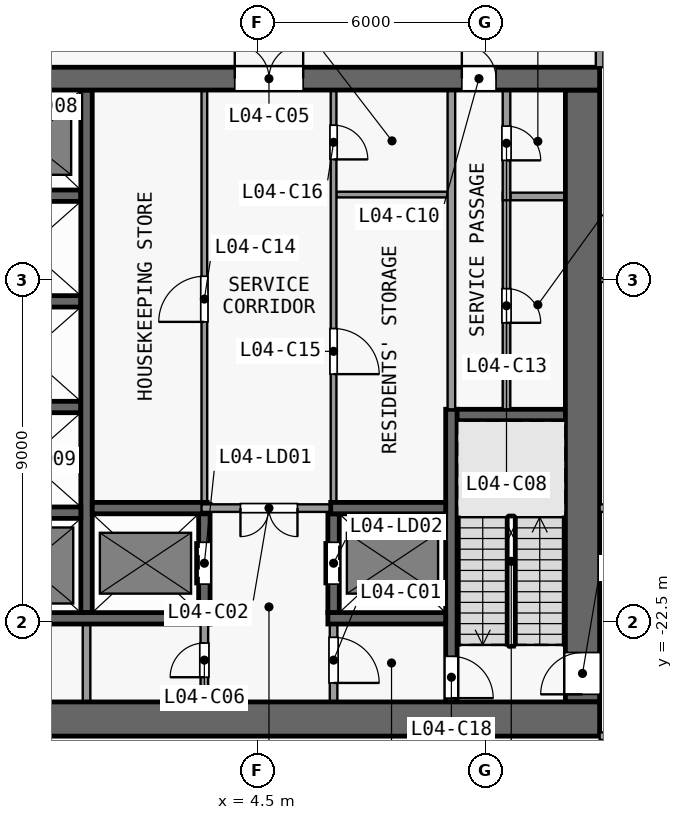
"""IFC4 building model, lengths in metres.
Left out: names, types, materials, properties, quantities, classifications, styles, units other than length and angle.
Written with IfcOpenShell. Run it as: python <this file> out.ifc"""

import sys

from ifc_helpers import new_model, si_unit, direction, frame, frame_2d, origin, place, context, subcontext, project, spatial, rectangle, extrude, element, fill, save


model = new_model("IFC4")
c1 = context("Model", 3, precision=1e-05, world=origin(), true_north=direction((0.0, 1.0)))
c2 = subcontext(c1, "Body", "Model", "MODEL_VIEW")
j1 = project(units=[si_unit("LENGTHUNIT", "METRE"), si_unit("PLANEANGLEUNIT", "RADIAN")], contexts=[c1])
p1 = place(None, origin())
s1 = spatial("IfcSite", under=j1, at=p1, CompositionType="ELEMENT")
p2 = place(p1, origin())
s2 = spatial("IfcBuilding", under=s1, at=p2, CompositionType="ELEMENT")
p3 = place(p2, frame((0.0, 0.0, 23.5)))
s3 = spatial("IfcBuildingStorey", under=s2, at=p3, CompositionType="ELEMENT", Elevation=23.5)
p4 = place(p3, frame((-13.5, -25.05, 0.0), z_axis=(0.0, 0.0, 1.0), x_axis=(1.0, 0.0, 0.0)))
e1 = element("IfcWall", 1, at=p4, inside=s3, PredefinedType="SHEAR", context=c2, shape_type="SweptSolid", body=[
    extrude(rectangle(XDim=27.0, YDim=0.9, at=frame_2d((13.5, 0.0))), origin(), (0.0, 0.0, 1.0), 4.15),
])
p5 = place(p3, frame((-13.5, -8.2, 0.0), z_axis=(0.0, 0.0, 1.0), x_axis=(1.0, 0.0, 0.0)))
e2 = element("IfcWall", 2, at=p5, inside=s3, PredefinedType="SHEAR", context=c2, shape_type="SweptSolid", body=[
    extrude(rectangle(XDim=27.0, YDim=0.6, at=frame_2d((13.5, 0.0))), origin(), (0.0, 0.0, 1.0), 4.15),
])
p6 = place(p5, frame((7.8, 0.0, 0.0)))
e3 = element("IfcOpeningElement", 3, at=p6, cuts=e2, PredefinedType="OPENING", context=c2, shape_type="SweptSolid", body=[
    extrude(rectangle(XDim=1.8, YDim=2.1, at=frame_2d((0.9, 1.05))), frame((0.0, 0.31, 0.0), z_axis=(0.0, -1.0, 0.0), x_axis=(1.0, 0.0, 0.0)), (0.0, 0.0, 1.0), 0.62),
])
p7 = place(p5, frame((17.4, 0.0, 0.0)))
e4 = element("IfcOpeningElement", 4, at=p7, cuts=e2, PredefinedType="OPENING", context=c2, shape_type="SweptSolid", body=[
    extrude(rectangle(XDim=1.8, YDim=2.1, at=frame_2d((0.9, 1.05))), frame((0.0, 0.31, 0.0), z_axis=(0.0, -1.0, 0.0), x_axis=(1.0, 0.0, 0.0)), (0.0, 0.0, 1.0), 0.62),
])
p8 = place(p5, frame((2.725, 0.0, 0.0)))
e5 = element("IfcOpeningElement", 5, at=p8, cuts=e2, PredefinedType="OPENING", context=c2, shape_type="SweptSolid", body=[
    extrude(rectangle(XDim=0.9, YDim=2.1, at=frame_2d((0.45, 1.05))), frame((0.0, 0.31, 0.0), z_axis=(0.0, -1.0, 0.0), x_axis=(1.0, 0.0, 0.0)), (0.0, 0.0, 1.0), 0.62),
])
p9 = place(p5, frame((23.375, 0.0, 0.0)))
e6 = element("IfcOpeningElement", 6, at=p9, cuts=e2, PredefinedType="OPENING", context=c2, shape_type="SweptSolid", body=[
    extrude(rectangle(XDim=0.9, YDim=2.1, at=frame_2d((0.45, 1.05))), frame((0.0, 0.31, 0.0), z_axis=(0.0, -1.0, 0.0), x_axis=(1.0, 0.0, 0.0)), (0.0, 0.0, 1.0), 0.62),
])
p10 = place(p3, frame((13.05, -24.6, 0.0), z_axis=(0.0, 0.0, 1.0), x_axis=(0.0, 1.0, 0.0)))
e7 = element("IfcWall", 7, at=p10, inside=s3, PredefinedType="SHEAR", context=c2, shape_type="SweptSolid", body=[
    extrude(rectangle(XDim=16.1, YDim=0.9, at=frame_2d((8.05, 0.0))), origin(), (0.0, 0.0, 1.0), 4.15),
])
p11 = place(p10, frame((0.2, 0.0, 0.0)))
e8 = element("IfcOpeningElement", 8, at=p11, cuts=e7, PredefinedType="OPENING", context=c2, shape_type="SweptSolid", body=[
    extrude(rectangle(XDim=1.1, YDim=2.1, at=frame_2d((0.55, 1.05))), frame((0.0, 0.46, 0.0), z_axis=(0.0, -1.0, 0.0), x_axis=(1.0, 0.0, 0.0)), (0.0, 0.0, 1.0), 0.92),
])
p12 = place(p3, frame((-2.95, -22.4, 0.0), z_axis=(0.0, 0.0, 1.0), x_axis=(1.0, 0.0, 0.0)))
e9 = element("IfcWall", 9, at=p12, inside=s3, PredefinedType="SHEAR", context=c2, shape_type="SweptSolid", body=[
    extrude(rectangle(XDim=6.2, YDim=0.3, at=frame_2d((3.1, 0.0))), origin(), (0.0, 0.0, 1.0), 4.15),
])
p13 = place(p3, frame((6.35, -22.4, 0.0), z_axis=(0.0, 0.0, 1.0), x_axis=(1.0, 0.0, 0.0)))
e10 = element("IfcWall", 10, at=p13, inside=s3, PredefinedType="SHEAR", context=c2, shape_type="SweptSolid", body=[
    extrude(rectangle(XDim=3.1, YDim=0.3, at=frame_2d((1.55, 0.0))), origin(), (0.0, 0.0, 1.0), 4.15),
])
p14 = place(p3, frame((-2.95, -19.62, 0.0), z_axis=(0.0, 0.0, 1.0), x_axis=(1.0, 0.0, 0.0)))
e11 = element("IfcWall", 11, at=p14, inside=s3, PredefinedType="SHEAR", context=c2, shape_type="SweptSolid", body=[
    extrude(rectangle(XDim=2.8, YDim=0.3, at=frame_2d((1.4, 0.0))), origin(), (0.0, 0.0, 1.0), 4.15),
])
p15 = place(p3, frame((0.15, -19.5, 0.0), z_axis=(0.0, 0.0, 1.0), x_axis=(1.0, 0.0, 0.0)))
e12 = element("IfcWall", 12, at=p15, inside=s3, PredefinedType="SHEAR", context=c2, shape_type="SweptSolid", body=[
    extrude(rectangle(XDim=3.025, YDim=0.3, at=frame_2d((1.513, 0.0))), origin(), (0.0, 0.0, 1.0), 4.15),
])
p16 = place(p3, frame((6.575, -19.5, 0.0), z_axis=(0.0, 0.0, 1.0), x_axis=(-1.0, 0.0, 0.0)))
e13 = element("IfcWall", 13, at=p16, inside=s3, PredefinedType="PARTITIONING", context=c2, shape_type="SweptSolid", body=[
    extrude(rectangle(XDim=3.55, YDim=0.2, at=frame_2d((1.775, 0.0))), origin(), (0.0, 0.0, 1.0), 4.15),
])
p17 = place(p16, frame((1.025, 0.0, 0.0)))
e14 = element("IfcOpeningElement", 14, at=p17, cuts=e13, PredefinedType="OPENING", context=c2, shape_type="SweptSolid", body=[
    extrude(rectangle(XDim=1.5, YDim=2.1, at=frame_2d((0.75, 1.05))), frame((0.0, 0.11, 0.0), z_axis=(0.0, -1.0, 0.0), x_axis=(1.0, 0.0, 0.0)), (0.0, 0.0, 1.0), 0.22),
])
p18 = place(p3, frame((6.425, -19.5, 0.0), z_axis=(0.0, 0.0, 1.0), x_axis=(1.0, 0.0, 0.0)))
e15 = element("IfcWall", 15, at=p18, inside=s3, PredefinedType="SHEAR", context=c2, shape_type="SweptSolid", body=[
    extrude(rectangle(XDim=3.025, YDim=0.3, at=frame_2d((1.512, 0.0))), origin(), (0.0, 0.0, 1.0), 4.15),
])
p19 = place(p3, frame((9.5, -17.05, 0.0), z_axis=(0.0, 0.0, 1.0), x_axis=(1.0, 0.0, 0.0)))
e16 = element("IfcWall", 16, at=p19, inside=s3, PredefinedType="SHEAR", context=c2, shape_type="SweptSolid", body=[
    extrude(rectangle(XDim=3.1, YDim=0.3, at=frame_2d((1.55, 0.0))), origin(), (0.0, 0.0, 1.0), 4.15),
])
for number, where, z_axis, x_axis in (
    (17, (-2.95, -16.84, 0.0), (0.0, 0.0, 1.0), (1.0, 0.0, 0.0)),
    (18, (-2.95, -14.06, 0.0), (0.0, 0.0, 1.0), (1.0, 0.0, 0.0)),
):
    element("IfcWall", number, at=place(p3, frame(where, z_axis=z_axis, x_axis=x_axis)), inside=s3, PredefinedType="SHEAR", context=c2, shape_type="SweptSolid", body=[
        extrude(rectangle(XDim=2.8, YDim=0.3, at=frame_2d((1.4, 0.0))), origin(), (0.0, 0.0, 1.0), 4.15),
    ])
p20 = place(p3, frame((11.15, -11.3, 0.0), z_axis=(0.0, 0.0, 1.0), x_axis=(1.0, 0.0, 0.0)))
e19 = element("IfcWall", 19, at=p20, inside=s3, PredefinedType="PARTITIONING", context=c2, shape_type="SweptSolid", body=[
    extrude(rectangle(XDim=1.45, YDim=0.2, at=frame_2d((0.725, 0.0))), origin(), (0.0, 0.0, 1.0), 4.15),
])
p21 = place(p3, frame((-2.95, -11.28, 0.0), z_axis=(0.0, 0.0, 1.0), x_axis=(1.0, 0.0, 0.0)))
e20 = element("IfcWall", 20, at=p21, inside=s3, PredefinedType="SHEAR", context=c2, shape_type="SweptSolid", body=[
    extrude(rectangle(XDim=2.8, YDim=0.3, at=frame_2d((1.4, 0.0))), origin(), (0.0, 0.0, 1.0), 4.15),
])
p22 = place(p3, frame((6.575, -11.25, 0.0), z_axis=(0.0, 0.0, 1.0), x_axis=(1.0, 0.0, 0.0)))
e21 = element("IfcWall", 21, at=p22, inside=s3, PredefinedType="PARTITIONING", context=c2, shape_type="SweptSolid", body=[
    extrude(rectangle(XDim=2.925, YDim=0.15, at=frame_2d((1.462, 0.0))), origin(), (0.0, 0.0, 1.0), 4.15),
])
p23 = place(p3, frame((0.0, -24.6, 0.0), z_axis=(0.0, 0.0, 1.0), x_axis=(0.0, 1.0, 0.0)))
e22 = element("IfcWall", 22, at=p23, inside=s3, PredefinedType="PARTITIONING", context=c2, shape_type="SweptSolid", body=[
    extrude(rectangle(XDim=2.05, YDim=0.2, at=frame_2d((1.025, 0.0))), origin(), (0.0, 0.0, 1.0), 4.15),
])
p24 = place(p3, frame((0.0, -22.25, 0.0), z_axis=(0.0, 0.0, 1.0), x_axis=(0.0, 1.0, 0.0)))
e23 = element("IfcWall", 23, at=p24, inside=s3, PredefinedType="SHEAR", context=c2, shape_type="SweptSolid", body=[
    extrude(rectangle(XDim=13.75, YDim=0.3, at=frame_2d((6.875, 0.0))), origin(), (0.0, 0.0, 1.0), 4.15),
])
p25 = place(p3, frame((3.1, -24.6, 0.0), z_axis=(0.0, 0.0, 1.0), x_axis=(0.0, 1.0, 0.0)))
e24 = element("IfcWall", 24, at=p25, inside=s3, PredefinedType="PARTITIONING", context=c2, shape_type="SweptSolid", body=[
    extrude(rectangle(XDim=2.05, YDim=0.2, at=frame_2d((1.025, 0.0))), origin(), (0.0, 0.0, 1.0), 4.15),
])
p26 = place(p25, frame((0.65, 0.0, 0.0)))
e25 = element("IfcOpeningElement", 25, at=p26, cuts=e24, PredefinedType="OPENING", context=c2, shape_type="SweptSolid", body=[
    extrude(rectangle(XDim=0.9, YDim=2.1, at=frame_2d((0.45, 1.05))), frame((0.0, 0.11, 0.0), z_axis=(0.0, -1.0, 0.0), x_axis=(1.0, 0.0, 0.0)), (0.0, 0.0, 1.0), 0.22),
])
p27 = place(p3, frame((3.1, -22.25, 0.0), z_axis=(0.0, 0.0, 1.0), x_axis=(0.0, 1.0, 0.0)))
e26 = element("IfcWall", 26, at=p27, inside=s3, PredefinedType="SHEAR", context=c2, shape_type="SweptSolid", body=[
    extrude(rectangle(XDim=2.85, YDim=0.3, at=frame_2d((1.425, 0.0))), origin(), (0.0, 0.0, 1.0), 4.15),
])
p28 = place(p27, frame((0.75, 0.0, 0.0)))
e27 = element("IfcOpeningElement", 27, at=p28, cuts=e26, PredefinedType="OPENING", context=c2, shape_type="SweptSolid", body=[
    extrude(rectangle(XDim=1.1, YDim=2.1, at=frame_2d((0.55, 1.05))), frame((0.0, 0.16, 0.0), z_axis=(0.0, -1.0, 0.0), x_axis=(1.0, 0.0, 0.0)), (0.0, 0.0, 1.0), 0.32),
])
p29 = place(p3, frame((3.1, -19.4, 0.0), z_axis=(0.0, 0.0, 1.0), x_axis=(0.0, 1.0, 0.0)))
e28 = element("IfcWall", 28, at=p29, inside=s3, PredefinedType="PARTITIONING", context=c2, shape_type="SweptSolid", body=[
    extrude(rectangle(XDim=10.9, YDim=0.15, at=frame_2d((5.45, 0.0))), origin(), (0.0, 0.0, 1.0), 4.15),
])
p30 = place(p29, frame((4.8, 0.0, 0.0)))
e29 = element("IfcOpeningElement", 29, at=p30, cuts=e28, PredefinedType="OPENING", context=c2, shape_type="SweptSolid", body=[
    extrude(rectangle(XDim=1.2, YDim=2.1, at=frame_2d((0.6, 1.05))), frame((0.0, 0.085, 0.0), z_axis=(0.0, -1.0, 0.0), x_axis=(1.0, 0.0, 0.0)), (0.0, 0.0, 1.0), 0.17),
])
p31 = place(p3, frame((6.5, -22.55, 0.0), z_axis=(0.0, 0.0, 1.0), x_axis=(0.0, -1.0, 0.0)))
e30 = element("IfcWall", 30, at=p31, inside=s3, PredefinedType="PARTITIONING", context=c2, shape_type="SweptSolid", body=[
    extrude(rectangle(XDim=2.05, YDim=0.2, at=frame_2d((1.025, 0.0))), origin(), (0.0, 0.0, 1.0), 4.15),
])
p32 = place(p31, frame((0.35, 0.0, 0.0)))
e31 = element("IfcOpeningElement", 31, at=p32, cuts=e30, PredefinedType="OPENING", context=c2, shape_type="SweptSolid", body=[
    extrude(rectangle(XDim=1.2, YDim=2.1, at=frame_2d((0.6, 1.05))), frame((0.0, 0.11, 0.0), z_axis=(0.0, -1.0, 0.0), x_axis=(1.0, 0.0, 0.0)), (0.0, 0.0, 1.0), 0.22),
])
p33 = place(p3, frame((6.5, -22.25, 0.0), z_axis=(0.0, 0.0, 1.0), x_axis=(0.0, 1.0, 0.0)))
e32 = element("IfcWall", 32, at=p33, inside=s3, PredefinedType="SHEAR", context=c2, shape_type="SweptSolid", body=[
    extrude(rectangle(XDim=2.6, YDim=0.3, at=frame_2d((1.3, 0.0))), origin(), (0.0, 0.0, 1.0), 4.15),
])
p34 = place(p33, frame((0.75, 0.0, 0.0)))
e33 = element("IfcOpeningElement", 33, at=p34, cuts=e32, PredefinedType="OPENING", context=c2, shape_type="SweptSolid", body=[
    extrude(rectangle(XDim=1.1, YDim=2.1, at=frame_2d((0.55, 1.05))), frame((0.0, 0.16, 0.0), z_axis=(0.0, -1.0, 0.0), x_axis=(1.0, 0.0, 0.0)), (0.0, 0.0, 1.0), 0.32),
])
p35 = place(p3, frame((6.5, -8.5, 0.0), z_axis=(0.0, 0.0, 1.0), x_axis=(0.0, -1.0, 0.0)))
e34 = element("IfcWall", 34, at=p35, inside=s3, PredefinedType="PARTITIONING", context=c2, shape_type="SweptSolid", body=[
    extrude(rectangle(XDim=10.85, YDim=0.15, at=frame_2d((5.425, 0.0))), origin(), (0.0, 0.0, 1.0), 4.15),
])
p36 = place(p35, frame((6.275, 0.0, 0.0)))
e35 = element("IfcOpeningElement", 35, at=p36, cuts=e34, PredefinedType="OPENING", context=c2, shape_type="SweptSolid", body=[
    extrude(rectangle(XDim=1.2, YDim=2.1, at=frame_2d((0.6, 1.05))), frame((0.0, 0.085, 0.0), z_axis=(0.0, -1.0, 0.0), x_axis=(1.0, 0.0, 0.0)), (0.0, 0.0, 1.0), 0.17),
])
p37 = place(p35, frame((0.925, 0.0, 0.0)))
e36 = element("IfcOpeningElement", 36, at=p37, cuts=e34, PredefinedType="OPENING", context=c2, shape_type="SweptSolid", body=[
    extrude(rectangle(XDim=0.9, YDim=2.1, at=frame_2d((0.45, 1.05))), frame((0.0, 0.085, 0.0), z_axis=(0.0, -1.0, 0.0), x_axis=(1.0, 0.0, 0.0)), (0.0, 0.0, 1.0), 0.17),
])
p38 = place(p3, frame((9.6, -16.9, 0.0), z_axis=(0.0, 0.0, 1.0), x_axis=(0.0, -1.0, 0.0)))
e37 = element("IfcWall", 37, at=p38, inside=s3, PredefinedType="SHEAR", context=c2, shape_type="SweptSolid", body=[
    extrude(rectangle(XDim=7.7, YDim=0.3, at=frame_2d((3.85, 0.0))), origin(), (0.0, 0.0, 1.0), 4.15),
])
p39 = place(p38, frame((6.5, 0.0, 0.0)))
e38 = element("IfcOpeningElement", 38, at=p39, cuts=e37, PredefinedType="OPENING", context=c2, shape_type="SweptSolid", body=[
    extrude(rectangle(XDim=1.1, YDim=2.1, at=frame_2d((0.55, 1.05))), frame((0.0, 0.16, 0.0), z_axis=(0.0, -1.0, 0.0), x_axis=(1.0, 0.0, 0.0)), (0.0, 0.0, 1.0), 0.32),
])
p40 = place(p3, frame((9.6, -16.9, 0.0), z_axis=(0.0, 0.0, 1.0), x_axis=(0.0, 1.0, 0.0)))
e39 = element("IfcWall", 39, at=p40, inside=s3, PredefinedType="PARTITIONING", context=c2, shape_type="SweptSolid", body=[
    extrude(rectangle(XDim=8.4, YDim=0.2, at=frame_2d((4.2, 0.0))), origin(), (0.0, 0.0, 1.0), 4.15),
])
p41 = place(p3, frame((11.05, -11.2, 0.0), z_axis=(0.0, 0.0, 1.0), x_axis=(0.0, -1.0, 0.0)))
e40 = element("IfcWall", 40, at=p41, inside=s3, PredefinedType="PARTITIONING", context=c2, shape_type="SweptSolid", body=[
    extrude(rectangle(XDim=5.7, YDim=0.2, at=frame_2d((2.85, 0.0))), origin(), (0.0, 0.0, 1.0), 4.15),
])
p42 = place(p41, frame((2.525, 0.0, 0.0)))
e41 = element("IfcOpeningElement", 41, at=p42, cuts=e40, PredefinedType="OPENING", context=c2, shape_type="SweptSolid", body=[
    extrude(rectangle(XDim=0.9, YDim=2.1, at=frame_2d((0.45, 1.05))), frame((0.0, 0.11, 0.0), z_axis=(0.0, -1.0, 0.0), x_axis=(1.0, 0.0, 0.0)), (0.0, 0.0, 1.0), 0.22),
])
p43 = place(p3, frame((11.05, -8.5, 0.0), z_axis=(0.0, 0.0, 1.0), x_axis=(0.0, -1.0, 0.0)))
e42 = element("IfcWall", 42, at=p43, inside=s3, PredefinedType="PARTITIONING", context=c2, shape_type="SweptSolid", body=[
    extrude(rectangle(XDim=2.9, YDim=0.2, at=frame_2d((1.45, 0.0))), origin(), (0.0, 0.0, 1.0), 4.15),
])
p44 = place(p43, frame((0.95, 0.0, 0.0)))
e43 = element("IfcOpeningElement", 43, at=p44, cuts=e42, PredefinedType="OPENING", context=c2, shape_type="SweptSolid", body=[
    extrude(rectangle(XDim=0.9, YDim=2.1, at=frame_2d((0.45, 1.05))), frame((0.0, 0.11, 0.0), z_axis=(0.0, -1.0, 0.0), x_axis=(1.0, 0.0, 0.0)), (0.0, 0.0, 1.0), 0.22),
])
p45 = place(p3, frame((13.5, -25.5, 0.0), z_axis=(0.0, 0.0, 1.0), x_axis=(1.0, 0.0, 0.0)))
e44 = element("IfcWall", 44, at=p45, inside=s3, PredefinedType="PARTITIONING", context=c2, shape_type="SweptSolid", body=[
    extrude(rectangle(XDim=4.1, YDim=0.2, at=frame_2d((2.05, 0.0))), origin(), (0.0, 0.0, 1.0), 4.15),
])
p46 = place(p3, frame((13.5, -19.5, 0.0), z_axis=(0.0, 0.0, 1.0), x_axis=(1.0, 0.0, 0.0)))
e45 = element("IfcWall", 45, at=p46, inside=s3, PredefinedType="PARTITIONING", context=c2, shape_type="SweptSolid", body=[
    extrude(rectangle(XDim=15.1, YDim=0.2, at=frame_2d((7.55, 0.0))), origin(), (0.0, 0.0, 1.0), 4.15),
])
p47 = place(p46, frame((7.0, 0.0, 0.0)))
e46 = element("IfcOpeningElement", 46, at=p47, cuts=e45, PredefinedType="OPENING", context=c2, shape_type="SweptSolid", body=[
    extrude(rectangle(XDim=1.0, YDim=2.1, at=frame_2d((0.5, 1.05))), frame((0.0, 0.11, 0.0), z_axis=(0.0, -1.0, 0.0), x_axis=(1.0, 0.0, 0.0)), (0.0, 0.0, 1.0), 0.22),
])
p48 = place(p3, frame((13.5, -13.5, 0.0), z_axis=(0.0, 0.0, 1.0), x_axis=(1.0, 0.0, 0.0)))
e47 = element("IfcWall", 47, at=p48, inside=s3, PredefinedType="PARTITIONING", context=c2, shape_type="SweptSolid", body=[
    extrude(rectangle(XDim=14.9, YDim=0.1, at=frame_2d((7.45, 0.0))), origin(), (0.0, 0.0, 1.0), 4.15),
])
p49 = place(p3, frame((13.5, -7.9, 0.0), z_axis=(0.0, 0.0, 1.0), x_axis=(0.0, 1.0, 0.0)))
e48 = element("IfcWall", 48, at=p49, inside=s3, PredefinedType="PARTITIONING", context=c2, shape_type="SweptSolid", body=[
    extrude(rectangle(XDim=3.3, YDim=0.2, at=frame_2d((1.65, 0.0))), origin(), (0.0, 0.0, 1.0), 4.15),
])
p50 = place(p28, origin())
e49 = element("IfcDoor", 49, at=p50, inside=s3, OperationType="DOUBLE_DOOR_SLIDING", PredefinedType="DOOR", context=c2, shape_type="SweptSolid", body=[
    extrude(rectangle(XDim=1.1, YDim=2.1, at=frame_2d((0.55, 1.05))), frame((0.0, 0.025, 0.0), z_axis=(0.0, -1.0, 0.0), x_axis=(1.0, 0.0, 0.0)), (0.0, 0.0, 1.0), 0.05),
])
fill(e27, e49)
p51 = place(p34, origin())
e50 = element("IfcDoor", 50, at=p51, inside=s3, OperationType="DOUBLE_DOOR_SLIDING", PredefinedType="DOOR", context=c2, shape_type="SweptSolid", body=[
    extrude(rectangle(XDim=1.1, YDim=2.1, at=frame_2d((0.55, 1.05))), frame((0.0, 0.025, 0.0), z_axis=(0.0, -1.0, 0.0), x_axis=(1.0, 0.0, 0.0)), (0.0, 0.0, 1.0), 0.05),
])
fill(e33, e50)
p52 = place(p32, origin())
e51 = element("IfcDoor", 51, at=p52, inside=s3, OperationType="SINGLE_SWING_RIGHT", PredefinedType="DOOR", context=c2, shape_type="SweptSolid", body=[
    extrude(rectangle(XDim=1.2, YDim=2.1, at=frame_2d((0.6, 1.05))), frame((0.0, 0.025, 0.0), z_axis=(0.0, -1.0, 0.0), x_axis=(1.0, 0.0, 0.0)), (0.0, 0.0, 1.0), 0.05),
])
fill(e31, e51)
p53 = place(p17, origin())
e52 = element("IfcDoor", 52, at=p53, inside=s3, OperationType="DOUBLE_DOOR_SINGLE_SWING", PredefinedType="DOOR", context=c2, shape_type="SweptSolid", body=[
    extrude(rectangle(XDim=1.5, YDim=2.1, at=frame_2d((0.75, 1.05))), frame((0.0, 0.025, 0.0), z_axis=(0.0, -1.0, 0.0), x_axis=(1.0, 0.0, 0.0)), (0.0, 0.0, 1.0), 0.05),
])
fill(e14, e52)
p54 = place(p7, origin())
e53 = element("IfcDoor", 53, at=p54, inside=s3, OperationType="DOUBLE_DOOR_SINGLE_SWING", PredefinedType="DOOR", context=c2, shape_type="SweptSolid", body=[
    extrude(rectangle(XDim=1.8, YDim=2.1, at=frame_2d((0.9, 1.05))), frame((0.0, 0.025, 0.0), z_axis=(0.0, -1.0, 0.0), x_axis=(1.0, 0.0, 0.0)), (0.0, 0.0, 1.0), 0.05),
])
fill(e4, e53)
p55 = place(p26, origin())
e54 = element("IfcDoor", 54, at=p55, inside=s3, OperationType="SINGLE_SWING_LEFT", PredefinedType="DOOR", context=c2, shape_type="SweptSolid", body=[
    extrude(rectangle(XDim=0.9, YDim=2.1, at=frame_2d((0.45, 1.05))), frame((0.0, 0.025, 0.0), z_axis=(0.0, -1.0, 0.0), x_axis=(1.0, 0.0, 0.0)), (0.0, 0.0, 1.0), 0.05),
])
fill(e25, e54)
p56 = place(p44, origin())
e55 = element("IfcDoor", 55, at=p56, inside=s3, OperationType="SINGLE_SWING_RIGHT", PredefinedType="DOOR", context=c2, shape_type="SweptSolid", body=[
    extrude(rectangle(XDim=0.9, YDim=2.1, at=frame_2d((0.45, 1.05))), frame((0.0, 0.025, 0.0), z_axis=(0.0, -1.0, 0.0), x_axis=(1.0, 0.0, 0.0)), (0.0, 0.0, 1.0), 0.05),
])
fill(e43, e55)
p57 = place(p9, origin())
e56 = element("IfcDoor", 56, at=p57, inside=s3, OperationType="SINGLE_SWING_LEFT", PredefinedType="DOOR", context=c2, shape_type="SweptSolid", body=[
    extrude(rectangle(XDim=0.9, YDim=2.1, at=frame_2d((0.45, 1.05))), frame((0.0, 0.025, 0.0), z_axis=(0.0, -1.0, 0.0), x_axis=(1.0, 0.0, 0.0)), (0.0, 0.0, 1.0), 0.05),
])
fill(e6, e56)
p58 = place(p42, origin())
e57 = element("IfcDoor", 57, at=p58, inside=s3, OperationType="SINGLE_SWING_RIGHT", PredefinedType="DOOR", context=c2, shape_type="SweptSolid", body=[
    extrude(rectangle(XDim=0.9, YDim=2.1, at=frame_2d((0.45, 1.05))), frame((0.0, 0.025, 0.0), z_axis=(0.0, -1.0, 0.0), x_axis=(1.0, 0.0, 0.0)), (0.0, 0.0, 1.0), 0.05),
])
fill(e41, e57)
p59 = place(p30, origin())
e58 = element("IfcDoor", 58, at=p59, inside=s3, OperationType="SINGLE_SWING_LEFT", PredefinedType="DOOR", context=c2, shape_type="SweptSolid", body=[
    extrude(rectangle(XDim=1.2, YDim=2.1, at=frame_2d((0.6, 1.05))), frame((0.0, 0.025, 0.0), z_axis=(0.0, -1.0, 0.0), x_axis=(1.0, 0.0, 0.0)), (0.0, 0.0, 1.0), 0.05),
])
fill(e29, e58)
p60 = place(p36, origin())
e59 = element("IfcDoor", 59, at=p60, inside=s3, OperationType="SINGLE_SWING_RIGHT", PredefinedType="DOOR", context=c2, shape_type="SweptSolid", body=[
    extrude(rectangle(XDim=1.2, YDim=2.1, at=frame_2d((0.6, 1.05))), frame((0.0, 0.025, 0.0), z_axis=(0.0, -1.0, 0.0), x_axis=(1.0, 0.0, 0.0)), (0.0, 0.0, 1.0), 0.05),
])
fill(e35, e59)
p61 = place(p37, origin())
e60 = element("IfcDoor", 60, at=p61, inside=s3, OperationType="SINGLE_SWING_RIGHT", PredefinedType="DOOR", context=c2, shape_type="SweptSolid", body=[
    extrude(rectangle(XDim=0.9, YDim=2.1, at=frame_2d((0.45, 1.05))), frame((0.0, 0.025, 0.0), z_axis=(0.0, -1.0, 0.0), x_axis=(1.0, 0.0, 0.0)), (0.0, 0.0, 1.0), 0.05),
])
fill(e36, e60)
p62 = place(p39, origin())
e61 = element("IfcDoor", 61, at=p62, inside=s3, OperationType="SINGLE_SWING_RIGHT", PredefinedType="DOOR", context=c2, shape_type="SweptSolid", body=[
    extrude(rectangle(XDim=1.1, YDim=2.1, at=frame_2d((0.55, 1.05))), frame((0.0, 0.025, 0.0), z_axis=(0.0, -1.0, 0.0), x_axis=(1.0, 0.0, 0.0)), (0.0, 0.0, 1.0), 0.05),
])
fill(e38, e61)
p63 = place(p11, origin())
e62 = element("IfcDoor", 62, at=p63, inside=s3, OperationType="SINGLE_SWING_LEFT", PredefinedType="DOOR", context=c2, shape_type="SweptSolid", body=[
    extrude(rectangle(XDim=1.1, YDim=2.1, at=frame_2d((0.55, 1.05))), frame((0.0, 0.025, 0.0), z_axis=(0.0, -1.0, 0.0), x_axis=(1.0, 0.0, 0.0)), (0.0, 0.0, 1.0), 0.05),
])
fill(e8, e62)
save(model, sys.argv[1])
